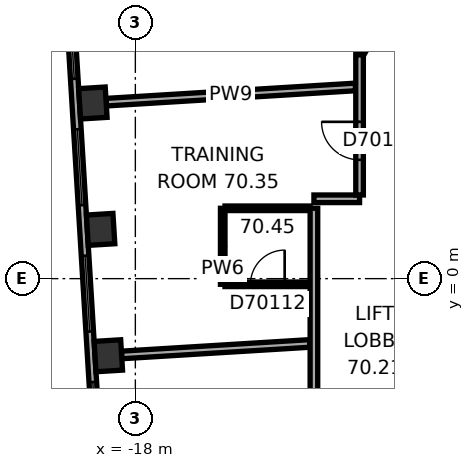
"""IFC4 building model, lengths in metres.
Left out: names, types, materials, properties, quantities, classifications, styles, units other than length and angle.
Written with IfcOpenShell. Run it as: python <this file> out.ifc"""

import sys

from ifc_helpers import new_model, si_unit, direction, frame, frame_2d, origin, origin_2d, place, context, subcontext, project, spatial, rectangle, extrude, element, fill, save


model = new_model("IFC4")
c1 = context("Model", 3, precision=1e-05, world=origin(), true_north=direction((0.0, 1.0)))
c2 = subcontext(c1, "Body", "Model", "MODEL_VIEW")
j1 = project(units=[si_unit("LENGTHUNIT", "METRE"), si_unit("PLANEANGLEUNIT", "RADIAN")], contexts=[c1])
p1 = place(None, origin())
s1 = spatial("IfcSite", under=j1, at=p1, CompositionType="ELEMENT")
p2 = place(p1, origin())
s2 = spatial("IfcBuilding", under=s1, at=p2, CompositionType="ELEMENT")
p3 = place(p2, frame((0.0, 0.0, 285.7)))
s3 = spatial("IfcBuildingStorey", under=s2, at=p3, CompositionType="ELEMENT", Elevation=285.7)
for number, where, z_axis, x_axis in (
    (1, (-19.118, 4.621, 0.0), (0.0, 0.0, 1.0), (0.061, -0.998, 0.0)),
    (2, (-18.914, 1.296, 0.0), (0.0, 0.0, 1.0), (0.061, -0.998, 0.0)),
    (3, (-18.711, -2.03, 0.0), (0.0, 0.0, 1.0), (0.061, -0.998, 0.0)),
):
    element("IfcColumn", number, at=place(p3, frame(where, z_axis=z_axis, x_axis=x_axis)), inside=s3, PredefinedType="COLUMN", context=c2, shape_type="SweptSolid", body=[
        extrude(rectangle(XDim=0.8, YDim=0.7, at=origin_2d()), origin(), (0.0, 0.0, 1.0), 3.7),
    ])
p4 = place(p3, frame((-19.803, 8.454, 0.0), z_axis=(0.0, 0.0, 1.0), x_axis=(0.061036717565, -0.998135521414, 0.0)))
e4 = element("IfcWall", 4, at=p4, inside=s3, PredefinedType="STANDARD", context=c2, shape_type="SweptSolid", body=[
    extrude(rectangle(XDim=17.731, YDim=0.2, at=frame_2d((8.866, 0.0))), origin(), (0.0, 0.0, 1.0), 3.7),
])
p5 = place(p4, frame((1.202, 0.0, 0.9)))
e5 = element("IfcOpeningElement", 5, at=p5, cuts=e4, PredefinedType="OPENING", context=c2, shape_type="SweptSolid", body=[
    extrude(rectangle(XDim=2.0, YDim=2.0, at=frame_2d((1.0, 1.0))), frame((0.0, 0.11, 0.0), z_axis=(0.0, -1.0, 0.0), x_axis=(1.0, 0.0, 0.0)), (0.0, 0.0, 1.0), 0.22),
])
p6 = place(p4, frame((4.533, 0.0, 0.9)))
e6 = element("IfcOpeningElement", 6, at=p6, cuts=e4, PredefinedType="OPENING", context=c2, shape_type="SweptSolid", body=[
    extrude(rectangle(XDim=2.0, YDim=2.0, at=frame_2d((1.0, 1.0))), frame((0.0, 0.11, 0.0), z_axis=(0.0, -1.0, 0.0), x_axis=(1.0, 0.0, 0.0)), (0.0, 0.0, 1.0), 0.22),
])
p7 = place(p4, frame((7.865, 0.0, 0.9)))
e7 = element("IfcOpeningElement", 7, at=p7, cuts=e4, PredefinedType="OPENING", context=c2, shape_type="SweptSolid", body=[
    extrude(rectangle(XDim=2.0, YDim=2.0, at=frame_2d((1.0, 1.0))), frame((0.0, 0.11, 0.0), z_axis=(0.0, -1.0, 0.0), x_axis=(1.0, 0.0, 0.0)), (0.0, 0.0, 1.0), 0.22),
])
p8 = place(p4, frame((11.197, 0.0, 0.9)))
e8 = element("IfcOpeningElement", 8, at=p8, cuts=e4, PredefinedType="OPENING", context=c2, shape_type="SweptSolid", body=[
    extrude(rectangle(XDim=2.0, YDim=2.0, at=frame_2d((1.0, 1.0))), frame((0.0, 0.11, 0.0), z_axis=(0.0, -1.0, 0.0), x_axis=(1.0, 0.0, 0.0)), (0.0, 0.0, 1.0), 0.22),
])
p9 = place(p4, frame((14.528, 0.0, 0.9)))
e9 = element("IfcOpeningElement", 9, at=p9, cuts=e4, PredefinedType="OPENING", context=c2, shape_type="SweptSolid", body=[
    extrude(rectangle(XDim=2.0, YDim=2.0, at=frame_2d((1.0, 1.0))), frame((0.0, 0.11, 0.0), z_axis=(0.0, -1.0, 0.0), x_axis=(1.0, 0.0, 0.0)), (0.0, 0.0, 1.0), 0.22),
])
p10 = place(p3, frame((-18.768, 4.643, 0.0), z_axis=(0.0, 0.0, 1.0), x_axis=(0.99813496285, 0.0610458511, 0.0)))
e10 = element("IfcWall", 10, at=p10, inside=s3, PredefinedType="PARTITIONING", context=c2, shape_type="SweptSolid", body=[
    extrude(rectangle(XDim=6.571, YDim=0.2, at=frame_2d((3.285, 0.0))), origin(), (0.0, 0.0, 1.0), 3.42),
])
p11 = place(p3, frame((-18.362, -2.008, 0.0), z_axis=(0.0, 0.0, 1.0), x_axis=(0.998135748374, 0.061033005966, 0.0)))
e11 = element("IfcWall", 11, at=p11, inside=s3, PredefinedType="PARTITIONING", context=c2, shape_type="SweptSolid", body=[
    extrude(rectangle(XDim=4.96, YDim=0.2, at=frame_2d((2.48, 0.0))), origin(), (0.0, 0.0, 1.0), 3.42),
])
p12 = place(p3, frame((-15.701, -0.149, 0.0), z_axis=(0.0, 0.0, 1.0), x_axis=(0.0, 1.0, 0.0)))
e12 = element("IfcWall", 12, at=p12, inside=s3, PredefinedType="PARTITIONING", context=c2, shape_type="SweptSolid", body=[
    extrude(rectangle(XDim=2.0, YDim=0.12, at=frame_2d((1.0, 0.0))), origin(), (0.0, 0.0, 1.0), 3.42),
])
p13 = place(p3, frame((-15.641, 1.851, 0.0), z_axis=(0.0, 0.0, 1.0), x_axis=(1.0, 0.0, 0.0)))
e13 = element("IfcWall", 13, at=p13, inside=s3, PredefinedType="PARTITIONING", context=c2, shape_type="SweptSolid", body=[
    extrude(rectangle(XDim=2.24, YDim=0.12, at=frame_2d((1.12, 0.0))), origin(), (0.0, 0.0, 1.0), 3.42),
])
p14 = place(p3, frame((-13.401, -0.149, 0.0), z_axis=(0.0, 0.0, 1.0), x_axis=(-1.0, 0.0, 0.0)))
e14 = element("IfcWall", 14, at=p14, inside=s3, PredefinedType="PARTITIONING", context=c2, shape_type="SweptSolid", body=[
    extrude(rectangle(XDim=2.24, YDim=0.12, at=frame_2d((1.12, 0.0))), origin(), (0.0, 0.0, 1.0), 3.42),
])
p15 = place(p14, frame((0.67, 0.0, 0.0)))
e15 = element("IfcOpeningElement", 15, at=p15, cuts=e14, PredefinedType="OPENING", context=c2, shape_type="SweptSolid", body=[
    extrude(rectangle(XDim=0.9, YDim=2.1, at=frame_2d((0.45, 1.05))), frame((0.0, 0.07, 0.0), z_axis=(0.0, -1.0, 0.0), x_axis=(1.0, 0.0, 0.0)), (0.0, 0.0, 1.0), 0.14),
])
p16 = place(p3, frame((-13.301, 1.851, 0.0), z_axis=(0.0, 0.0, 1.0), x_axis=(0.0, -1.0, 0.0)))
e16 = element("IfcWall", 16, at=p16, inside=s3, PredefinedType="PARTITIONING", context=c2, shape_type="SweptSolid", body=[
    extrude(rectangle(XDim=5.852, YDim=0.2, at=frame_2d((2.926, 0.0))), origin(), (0.0, 0.0, 1.0), 3.42),
])
p17 = place(p3, frame((-12.1, 2.101, 0.0), z_axis=(0.0, 0.0, 1.0), x_axis=(-1.0, 0.0, 0.0)))
e17 = element("IfcWall", 17, at=p17, inside=s3, PredefinedType="PARTITIONING", context=c2, shape_type="SweptSolid", body=[
    extrude(rectangle(XDim=1.201, YDim=0.2, at=frame_2d((0.601, 0.0))), origin(), (0.0, 0.0, 1.0), 3.42),
])
p18 = place(p3, frame((-12.1, 5.889, 0.0), z_axis=(0.0, 0.0, 1.0), x_axis=(0.0, -1.0, 0.0)))
e18 = element("IfcWall", 18, at=p18, inside=s3, PredefinedType="PARTITIONING", context=c2, shape_type="SweptSolid", body=[
    extrude(rectangle(XDim=3.688, YDim=0.2, at=frame_2d((1.844, 0.0))), origin(), (0.0, 0.0, 1.0), 3.42),
])
p19 = place(p18, frame((1.763, 0.0, 0.0)))
e19 = element("IfcOpeningElement", 19, at=p19, cuts=e18, PredefinedType="OPENING", context=c2, shape_type="SweptSolid", body=[
    extrude(rectangle(XDim=1.0, YDim=2.1, at=frame_2d((0.5, 1.05))), frame((0.0, 0.11, 0.0), z_axis=(0.0, -1.0, 0.0), x_axis=(1.0, 0.0, 0.0)), (0.0, 0.0, 1.0), 0.22),
])
p20 = place(p3, frame((-11.15, 7.534, 0.0), z_axis=(0.0, 0.0, 1.0), x_axis=(-0.500063286585, -0.865988862174, 0.0)))
e20 = element("IfcWall", 20, at=p20, inside=s3, PredefinedType="PARTITIONING", context=c2, shape_type="SweptSolid", body=[
    extrude(rectangle(XDim=1.86, YDim=0.2, at=frame_2d((0.93, 0.0))), origin(), (0.0, 0.0, 1.0), 3.42),
])
p21 = place(p20, frame((0.43, 0.0, 0.0)))
e21 = element("IfcOpeningElement", 21, at=p21, cuts=e20, PredefinedType="OPENING", context=c2, shape_type="SweptSolid", body=[
    extrude(rectangle(XDim=1.0, YDim=2.1, at=frame_2d((0.5, 1.05))), frame((0.0, 0.11, 0.0), z_axis=(0.0, -1.0, 0.0), x_axis=(1.0, 0.0, 0.0)), (0.0, 0.0, 1.0), 0.22),
])
p22 = place(p5, origin())
e22 = element("IfcWindow", 22, at=p22, inside=s3, PartitioningType="SINGLE_PANEL", PredefinedType="WINDOW", context=c2, shape_type="SweptSolid", body=[
    extrude(rectangle(XDim=2.0, YDim=2.0, at=frame_2d((1.0, 1.0))), frame((0.0, 0.03, 0.0), z_axis=(0.0, -1.0, 0.0), x_axis=(1.0, 0.0, 0.0)), (0.0, 0.0, 1.0), 0.06),
])
fill(e5, e22)
p23 = place(p6, origin())
e23 = element("IfcWindow", 23, at=p23, inside=s3, PartitioningType="SINGLE_PANEL", PredefinedType="WINDOW", context=c2, shape_type="SweptSolid", body=[
    extrude(rectangle(XDim=2.0, YDim=2.0, at=frame_2d((1.0, 1.0))), frame((0.0, 0.03, 0.0), z_axis=(0.0, -1.0, 0.0), x_axis=(1.0, 0.0, 0.0)), (0.0, 0.0, 1.0), 0.06),
])
fill(e6, e23)
p24 = place(p7, origin())
e24 = element("IfcWindow", 24, at=p24, inside=s3, PartitioningType="SINGLE_PANEL", PredefinedType="WINDOW", context=c2, shape_type="SweptSolid", body=[
    extrude(rectangle(XDim=2.0, YDim=2.0, at=frame_2d((1.0, 1.0))), frame((0.0, 0.03, 0.0), z_axis=(0.0, -1.0, 0.0), x_axis=(1.0, 0.0, 0.0)), (0.0, 0.0, 1.0), 0.06),
])
fill(e7, e24)
p25 = place(p8, origin())
e25 = element("IfcWindow", 25, at=p25, inside=s3, PartitioningType="SINGLE_PANEL", PredefinedType="WINDOW", context=c2, shape_type="SweptSolid", body=[
    extrude(rectangle(XDim=2.0, YDim=2.0, at=frame_2d((1.0, 1.0))), frame((0.0, 0.03, 0.0), z_axis=(0.0, -1.0, 0.0), x_axis=(1.0, 0.0, 0.0)), (0.0, 0.0, 1.0), 0.06),
])
fill(e8, e25)
p26 = place(p19, origin())
e26 = element("IfcDoor", 26, at=p26, inside=s3, OperationType="SINGLE_SWING_LEFT", PredefinedType="DOOR", context=c2, shape_type="SweptSolid", body=[
    extrude(rectangle(XDim=1.0, YDim=2.1, at=frame_2d((0.5, 1.05))), frame((0.0, 0.025, 0.0), z_axis=(0.0, -1.0, 0.0), x_axis=(1.0, 0.0, 0.0)), (0.0, 0.0, 1.0), 0.05),
])
fill(e19, e26)
p27 = place(p15, origin())
e27 = element("IfcDoor", 27, at=p27, inside=s3, OperationType="SINGLE_SWING_LEFT", PredefinedType="DOOR", context=c2, shape_type="SweptSolid", body=[
    extrude(rectangle(XDim=0.9, YDim=2.1, at=frame_2d((0.45, 1.05))), frame((0.0, 0.025, 0.0), z_axis=(0.0, -1.0, 0.0), x_axis=(1.0, 0.0, 0.0)), (0.0, 0.0, 1.0), 0.05),
])
fill(e15, e27)
save(model, sys.argv[1])
